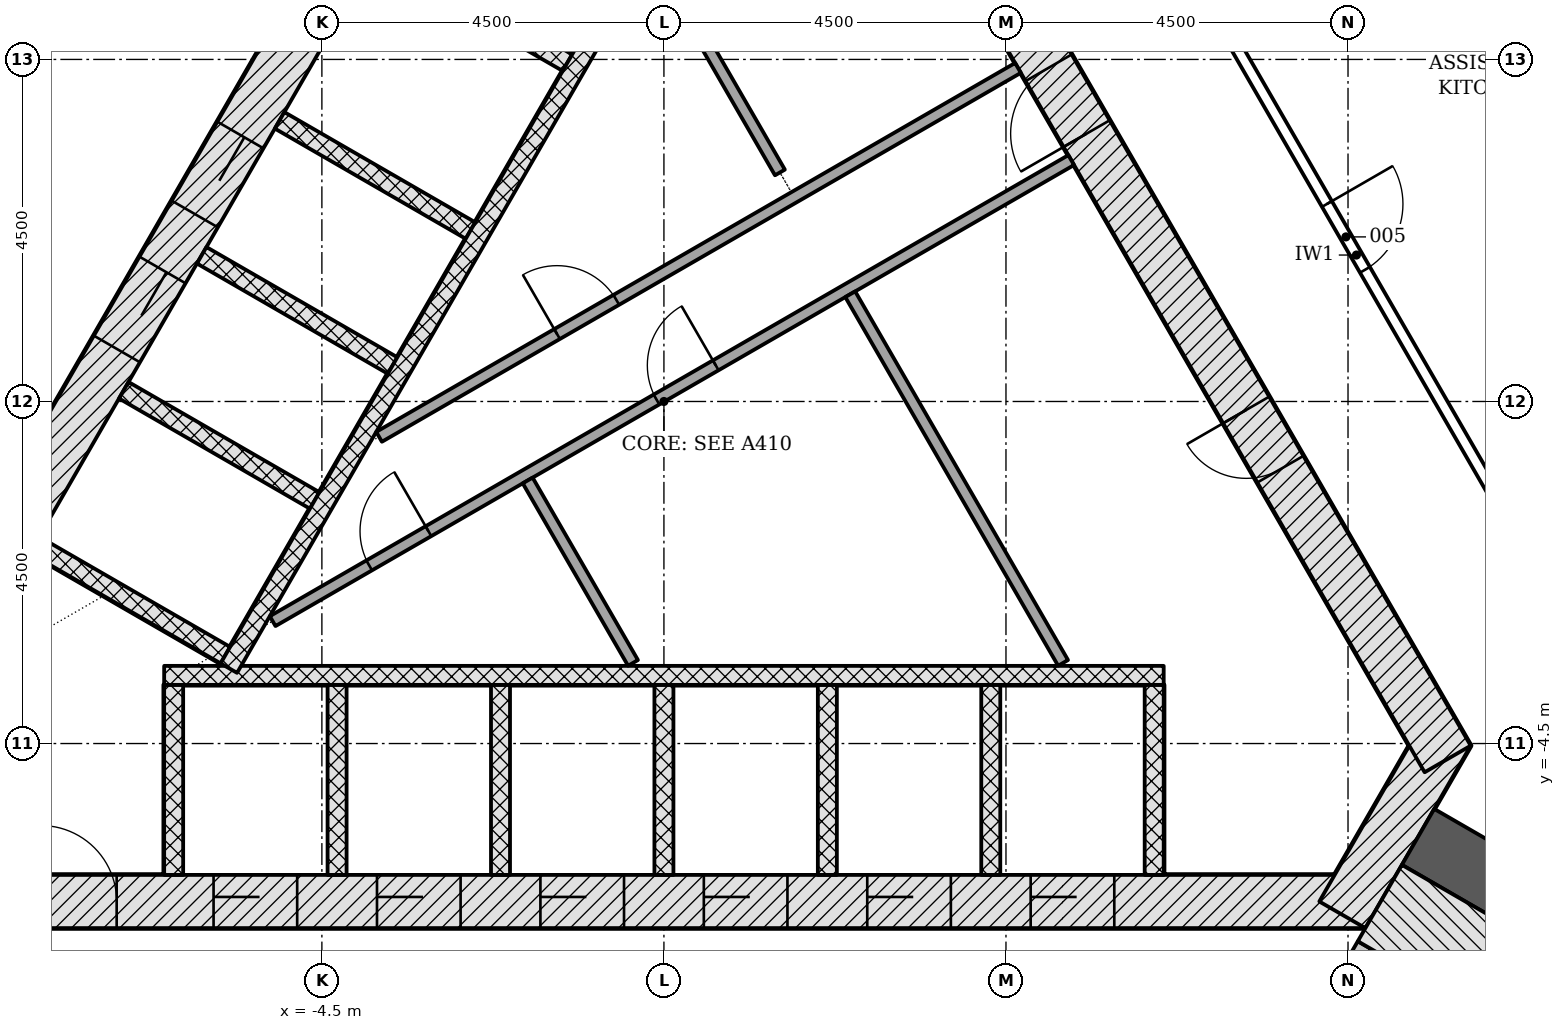
"""IFC4 building model, lengths in metres.
Left out: names, types, materials, properties, quantities, classifications, styles, units other than length and angle.
Written with IfcOpenShell. Run it as: python <this file> out.ifc"""

import sys

from ifc_helpers import new_model, si_unit, direction, frame, frame_2d, origin, place, context, subcontext, project, spatial, rectangle, extrude, element, fill, save


model = new_model("IFC4")
c1 = context("Model", 3, precision=1e-05, world=origin(), true_north=direction((0.0, 1.0)))
c2 = subcontext(c1, "Body", "Model", "MODEL_VIEW")
j1 = project(units=[si_unit("LENGTHUNIT", "METRE"), si_unit("PLANEANGLEUNIT", "RADIAN")], contexts=[c1])
p1 = place(None, origin())
s1 = spatial("IfcSite", under=j1, at=p1, CompositionType="ELEMENT")
p2 = place(p1, origin())
s2 = spatial("IfcBuilding", under=s1, at=p2, CompositionType="ELEMENT")
p3 = place(p2, frame((0.0, 0.0, 69.0)))
s3 = spatial("IfcBuildingStorey", under=s2, at=p3, CompositionType="ELEMENT", Elevation=69.0)
p4 = place(p3, frame((-9.229, -6.578, -0.2), z_axis=(0.0, 0.0, 1.0), x_axis=(1.0, 0.0, 0.0)))
e1 = element("IfcWall", 1, at=p4, inside=s3, PredefinedType="SHEAR", context=c2, shape_type="SweptSolid", body=[
    extrude(rectangle(XDim=18.458, YDim=0.7, at=frame_2d((9.229, 0.0))), origin(), (0.0, 0.0, 1.0), 3.6),
])
p5 = place(p4, frame((3.304, 0.0, 0.2)))
e2 = element("IfcOpeningElement", 2, at=p5, cuts=e1, PredefinedType="OPENING", context=c2, shape_type="SweptSolid", body=[
    extrude(rectangle(XDim=1.1, YDim=2.1, at=frame_2d((0.55, 1.05))), frame((0.0, 0.36, 0.0), z_axis=(0.0, -1.0, 0.0), x_axis=(1.0, 0.0, 0.0)), (0.0, 0.0, 1.0), 0.72),
])
p6 = place(p4, frame((5.454, 0.0, 0.2)))
e3 = element("IfcOpeningElement", 3, at=p6, cuts=e1, PredefinedType="OPENING", context=c2, shape_type="SweptSolid", body=[
    extrude(rectangle(XDim=1.1, YDim=2.1, at=frame_2d((0.55, 1.05))), frame((0.0, 0.36, 0.0), z_axis=(0.0, -1.0, 0.0), x_axis=(1.0, 0.0, 0.0)), (0.0, 0.0, 1.0), 0.72),
])
p7 = place(p4, frame((7.604, 0.0, 0.2)))
e4 = element("IfcOpeningElement", 4, at=p7, cuts=e1, PredefinedType="OPENING", context=c2, shape_type="SweptSolid", body=[
    extrude(rectangle(XDim=1.1, YDim=2.1, at=frame_2d((0.55, 1.05))), frame((0.0, 0.36, 0.0), z_axis=(0.0, -1.0, 0.0), x_axis=(1.0, 0.0, 0.0)), (0.0, 0.0, 1.0), 0.72),
])
p8 = place(p4, frame((9.754, 0.0, 0.2)))
e5 = element("IfcOpeningElement", 5, at=p8, cuts=e1, PredefinedType="OPENING", context=c2, shape_type="SweptSolid", body=[
    extrude(rectangle(XDim=1.1, YDim=2.1, at=frame_2d((0.55, 1.05))), frame((0.0, 0.36, 0.0), z_axis=(0.0, -1.0, 0.0), x_axis=(1.0, 0.0, 0.0)), (0.0, 0.0, 1.0), 0.72),
])
p9 = place(p4, frame((11.904, 0.0, 0.2)))
e6 = element("IfcOpeningElement", 6, at=p9, cuts=e1, PredefinedType="OPENING", context=c2, shape_type="SweptSolid", body=[
    extrude(rectangle(XDim=1.1, YDim=2.1, at=frame_2d((0.55, 1.05))), frame((0.0, 0.36, 0.0), z_axis=(0.0, -1.0, 0.0), x_axis=(1.0, 0.0, 0.0)), (0.0, 0.0, 1.0), 0.72),
])
p10 = place(p4, frame((14.054, 0.0, 0.2)))
e7 = element("IfcOpeningElement", 7, at=p10, cuts=e1, PredefinedType="OPENING", context=c2, shape_type="SweptSolid", body=[
    extrude(rectangle(XDim=1.1, YDim=2.1, at=frame_2d((0.55, 1.05))), frame((0.0, 0.36, 0.0), z_axis=(0.0, -1.0, 0.0), x_axis=(1.0, 0.0, 0.0)), (0.0, 0.0, 1.0), 0.72),
])
p11 = place(p4, frame((1.029, 0.0, 0.2)))
e8 = element("IfcOpeningElement", 8, at=p11, cuts=e1, PredefinedType="OPENING", context=c2, shape_type="SweptSolid", body=[
    extrude(rectangle(XDim=1.0, YDim=2.1, at=frame_2d((0.5, 1.05))), frame((0.0, 0.36, 0.0), z_axis=(0.0, -1.0, 0.0), x_axis=(1.0, 0.0, 0.0)), (0.0, 0.0, 1.0), 0.72),
])
p12 = place(p3, frame((8.926, -6.753, -0.2), z_axis=(0.0, 0.0, 1.0), x_axis=(0.500042739161, 0.866000726912, 0.0)))
e9 = element("IfcWall", 9, at=p12, inside=s3, PredefinedType="SHEAR", context=c2, shape_type="SweptSolid", body=[
    extrude(rectangle(XDim=2.771, YDim=0.7, at=frame_2d((1.386, 0.0))), origin(), (0.0, 0.0, 1.0), 3.6),
])
p13 = place(p3, frame((10.311, -4.703, -0.2), z_axis=(0.0, 0.0, 1.0), x_axis=(-0.500001446645, 0.866024568562, 0.0)))
e10 = element("IfcWall", 10, at=p13, inside=s3, PredefinedType="SHEAR", context=c2, shape_type="SweptSolid", body=[
    extrude(rectangle(XDim=18.458, YDim=0.7, at=frame_2d((9.229, 0.0))), origin(), (0.0, 0.0, 1.0), 3.6),
])
p14 = place(p13, frame((9.5, 0.0, 0.2)))
e11 = element("IfcOpeningElement", 11, at=p14, cuts=e10, PredefinedType="OPENING", context=c2, shape_type="SweptSolid", body=[
    extrude(rectangle(XDim=1.0, YDim=2.1, at=frame_2d((0.5, 1.05))), frame((0.0, 0.36, 0.0), z_axis=(0.0, -1.0, 0.0), x_axis=(1.0, 0.0, 0.0)), (0.0, 0.0, 1.0), 0.72),
])
p15 = place(p13, frame((4.402, 0.0, 0.2)))
e12 = element("IfcOpeningElement", 12, at=p15, cuts=e10, PredefinedType="OPENING", context=c2, shape_type="SweptSolid", body=[
    extrude(rectangle(XDim=0.9, YDim=2.1, at=frame_2d((0.45, 1.05))), frame((0.0, 0.36, 0.0), z_axis=(0.0, -1.0, 0.0), x_axis=(1.0, 0.0, 0.0)), (0.0, 0.0, 1.0), 0.72),
])
p16 = place(p13, frame((13.927, 0.0, 0.2)))
e13 = element("IfcOpeningElement", 13, at=p16, cuts=e10, PredefinedType="OPENING", context=c2, shape_type="SweptSolid", body=[
    extrude(rectangle(XDim=0.9, YDim=2.1, at=frame_2d((0.45, 1.05))), frame((0.0, 0.36, 0.0), z_axis=(0.0, -1.0, 0.0), x_axis=(1.0, 0.0, 0.0)), (0.0, 0.0, 1.0), 0.72),
])
p17 = place(p3, frame((-1.083, 11.281, -0.2), z_axis=(0.0, 0.0, 1.0), x_axis=(-0.500001446645, -0.866024568562, 0.0)))
e14 = element("IfcWall", 14, at=p17, inside=s3, PredefinedType="SHEAR", context=c2, shape_type="SweptSolid", body=[
    extrude(rectangle(XDim=18.458, YDim=0.7, at=frame_2d((9.229, 0.0))), origin(), (0.0, 0.0, 1.0), 3.6),
])
p18 = place(p17, frame((8.979, 0.0, 0.2)))
e15 = element("IfcOpeningElement", 15, at=p18, cuts=e14, PredefinedType="OPENING", context=c2, shape_type="SweptSolid", body=[
    extrude(rectangle(XDim=1.2, YDim=2.1, at=frame_2d((0.6, 1.05))), frame((0.0, 0.36, 0.0), z_axis=(0.0, -1.0, 0.0), x_axis=(1.0, 0.0, 0.0)), (0.0, 0.0, 1.0), 0.72),
])
p19 = place(p17, frame((11.029, 0.0, 0.2)))
e16 = element("IfcOpeningElement", 16, at=p19, cuts=e14, PredefinedType="OPENING", context=c2, shape_type="SweptSolid", body=[
    extrude(rectangle(XDim=1.2, YDim=2.1, at=frame_2d((0.6, 1.05))), frame((0.0, 0.36, 0.0), z_axis=(0.0, -1.0, 0.0), x_axis=(1.0, 0.0, 0.0)), (0.0, 0.0, 1.0), 0.72),
])
p20 = place(p3, frame((9.922, -5.728, -0.2), z_axis=(0.0, 0.0, 1.0), x_axis=(0.866026077102, -0.499998833779, 0.0)))
e17 = element("IfcWall", 17, at=p20, inside=s3, PredefinedType="SHEAR", context=c2, shape_type="SweptSolid", body=[
    extrude(rectangle(XDim=13.381, YDim=0.85, at=frame_2d((6.691, 0.0))), origin(), (0.0, 0.0, 1.0), 3.6),
])
for number, where, z_axis, x_axis in (
    (18, (-6.45, -6.228, -0.2), (0.0, 0.0, 1.0), (0.0, 1.0, 0.0)),
    (19, (-4.3, -6.228, -0.2), (0.0, 0.0, 1.0), (0.0, 1.0, 0.0)),
    (20, (-2.15, -6.228, -0.2), (0.0, 0.0, 1.0), (0.0, 1.0, 0.0)),
    (21, (0.0, -6.228, -0.2), (0.0, 0.0, 1.0), (0.0, 1.0, 0.0)),
    (22, (2.15, -6.228, -0.2), (0.0, 0.0, 1.0), (0.0, 1.0, 0.0)),
    (23, (4.3, -6.228, -0.2), (0.0, 0.0, 1.0), (0.0, 1.0, 0.0)),
    (24, (6.45, -6.228, -0.2), (0.0, 0.0, 1.0), (0.0, 1.0, 0.0)),
):
    element("IfcWall", number, at=place(p3, frame(where, z_axis=z_axis, x_axis=x_axis)), inside=s3, PredefinedType="PARTITIONING", context=c2, shape_type="SweptSolid", body=[
        extrude(rectangle(XDim=2.5, YDim=0.25, at=frame_2d((1.25, 0.0))), origin(), (0.0, 0.0, 1.0), 3.6),
    ])
p21 = place(p3, frame((-6.575, -3.603, 0.0), z_axis=(0.0, 0.0, 1.0), x_axis=(1.0, 0.0, 0.0)))
e25 = element("IfcWall", 25, at=p21, inside=s3, PredefinedType="PARTITIONING", context=c2, shape_type="SweptSolid", body=[
    extrude(rectangle(XDim=13.15, YDim=0.25, at=frame_2d((6.575, 0.0))), origin(), (0.0, 0.0, 1.0), 3.4),
])
for number, where, z_axis, x_axis in (
    (26, (-3.781, 5.907, -0.2), (0.0, 0.0, 1.0), (0.866, -0.5, 0.0)),
    (27, (-5.056, 3.699, -0.2), (0.0, 0.0, 1.0), (0.866, -0.5, 0.0)),
    (28, (-6.081, 1.923, -0.2), (0.0, 0.0, 1.0), (0.866, -0.5, 0.0)),
    (29, (-7.106, 0.148, -0.2), (0.0, 0.0, 1.0), (0.866, -0.5, 0.0)),
    (30, (-8.281, -1.887, -0.2), (0.0, 0.0, 1.0), (0.866, -0.5, 0.0)),
):
    element("IfcWall", number, at=place(p3, frame(where, z_axis=z_axis, x_axis=x_axis)), inside=s3, PredefinedType="PARTITIONING", context=c2, shape_type="SweptSolid", body=[
        extrude(rectangle(XDim=2.9, YDim=0.25, at=frame_2d((1.45, 0.0))), origin(), (0.0, 0.0, 1.0), 3.6),
    ])
p22 = place(p3, frame((0.176, 6.711, 0.0), z_axis=(0.0, 0.0, 1.0), x_axis=(-0.500004227369, -0.866022963098, 0.0)))
e31 = element("IfcWall", 31, at=p22, inside=s3, PredefinedType="PARTITIONING", context=c2, shape_type="SweptSolid", body=[
    extrude(rectangle(XDim=11.8, YDim=0.25, at=frame_2d((5.9, 0.0))), origin(), (0.0, 0.0, 1.0), 3.4),
])
p23 = place(p3, frame((-5.148, -2.89, 0.0), z_axis=(0.0, 0.0, 1.0), x_axis=(0.866030081544, 0.499991897794, 0.0)))
e32 = element("IfcWall", 32, at=p23, inside=s3, PredefinedType="PARTITIONING", context=c2, shape_type="SweptSolid", body=[
    extrude(rectangle(XDim=12.131, YDim=0.15, at=frame_2d((6.065, 0.0))), origin(), (0.0, 0.0, 1.0), 3.4),
])
p24 = place(p23, frame((5.831, 0.0, 0.0)))
e33 = element("IfcOpeningElement", 33, at=p24, cuts=e32, PredefinedType="OPENING", context=c2, shape_type="SweptSolid", body=[
    extrude(rectangle(XDim=0.9, YDim=2.1, at=frame_2d((0.45, 1.05))), frame((0.0, 0.085, 0.0), z_axis=(0.0, -1.0, 0.0), x_axis=(1.0, 0.0, 0.0)), (0.0, 0.0, 1.0), 0.17),
])
p25 = place(p23, frame((1.467, 0.0, 0.0)))
e34 = element("IfcOpeningElement", 34, at=p25, cuts=e32, PredefinedType="OPENING", context=c2, shape_type="SweptSolid", body=[
    extrude(rectangle(XDim=0.9, YDim=2.1, at=frame_2d((0.45, 1.05))), frame((0.0, 0.085, 0.0), z_axis=(0.0, -1.0, 0.0), x_axis=(1.0, 0.0, 0.0)), (0.0, 0.0, 1.0), 0.17),
])
p26 = place(p3, frame((-3.748, -0.465, 0.0), z_axis=(0.0, 0.0, 1.0), x_axis=(0.866033540873, 0.499985905884, 0.0)))
e35 = element("IfcWall", 35, at=p26, inside=s3, PredefinedType="PARTITIONING", context=c2, shape_type="SweptSolid", body=[
    extrude(rectangle(XDim=9.706, YDim=0.15, at=frame_2d((4.853, 0.0))), origin(), (0.0, 0.0, 1.0), 3.4),
])
p27 = place(p26, frame((2.704, 0.0, 0.0)))
e36 = element("IfcOpeningElement", 36, at=p27, cuts=e35, PredefinedType="OPENING", context=c2, shape_type="SweptSolid", body=[
    extrude(rectangle(XDim=0.9, YDim=2.1, at=frame_2d((0.45, 1.05))), frame((0.0, 0.085, 0.0), z_axis=(0.0, -1.0, 0.0), x_axis=(1.0, 0.0, 0.0)), (0.0, 0.0, 1.0), 0.17),
])
p28 = place(p3, frame((1.526, 3.013, 0.0), z_axis=(0.0, 0.0, 1.0), x_axis=(-0.499978925887, 0.866037570588, 0.0)))
e37 = element("IfcWall", 37, at=p28, inside=s3, PredefinedType="PARTITIONING", context=c2, shape_type="SweptSolid", body=[
    extrude(rectangle(XDim=3.296, YDim=0.15, at=frame_2d((1.648, 0.0))), origin(), (0.0, 0.0, 1.0), 3.4),
])
p29 = place(p3, frame((-0.407, -3.439, 0.0), z_axis=(0.0, 0.0, 1.0), x_axis=(-0.500004591975, 0.86602275259, 0.0)))
e38 = element("IfcWall", 38, at=p29, inside=s3, PredefinedType="PARTITIONING", context=c2, shape_type="SweptSolid", body=[
    extrude(rectangle(XDim=2.771, YDim=0.15, at=frame_2d((1.386, 0.0))), origin(), (0.0, 0.0, 1.0), 3.4),
])
p30 = place(p3, frame((5.251, -3.439, 0.0), z_axis=(0.0, 0.0, 1.0), x_axis=(-0.500011755427, 0.866018616679, 0.0)))
e39 = element("IfcWall", 39, at=p30, inside=s3, PredefinedType="PARTITIONING", context=c2, shape_type="SweptSolid", body=[
    extrude(rectangle(XDim=5.6, YDim=0.15, at=frame_2d((2.8, 0.0))), origin(), (0.0, 0.0, 1.0), 3.4),
])
p31 = place(p3, frame((7.44, -10.226, -0.2), z_axis=(0.0, 0.0, 1.0), x_axis=(0.500022077904, 0.866012656725, 0.0)))
e40 = element("IfcWall", 40, at=p31, inside=s3, PredefinedType="SHEAR", context=c2, shape_type="SweptSolid", body=[
    extrude(rectangle(XDim=3.55, YDim=0.2, at=frame_2d((1.775, 0.0))), origin(), (0.0, 0.0, 1.0), 3.6),
])
p32 = place(p31, frame((1.175, 0.0, 0.2)))
e41 = element("IfcOpeningElement", 41, at=p32, cuts=e40, PredefinedType="OPENING", context=c2, shape_type="SweptSolid", body=[
    extrude(rectangle(XDim=1.2, YDim=2.1, at=frame_2d((0.6, 1.05))), frame((0.0, 0.11, 0.0), z_axis=(0.0, -1.0, 0.0), x_axis=(1.0, 0.0, 0.0)), (0.0, 0.0, 1.0), 0.22),
])
p33 = place(p3, frame((9.419, -6.599, -0.2), z_axis=(0.0, 0.0, 1.0), x_axis=(0.866033125095, -0.499986626058, 0.0)))
e42 = element("IfcWall", 42, at=p33, inside=s3, PredefinedType="SHEAR", context=c2, shape_type="SweptSolid", body=[
    extrude(rectangle(XDim=7.2, YDim=1.161, at=frame_2d((3.6, 0.0))), origin(), (0.0, 0.0, 1.0), 3.6),
])
p34 = place(p3, frame((-16.256, -3.149, 0.0), z_axis=(0.0, 0.0, 1.0), x_axis=(0.499999683919, 0.866025586274, 0.0)))
e43 = element("IfcWall", 43, at=p34, inside=s3, PredefinedType="PARTITIONING", context=c2, shape_type="SweptSolid", body=[
    extrude(rectangle(XDim=22.234, YDim=0.15, at=frame_2d((11.117, 0.0))), origin(), (0.0, 0.0, 1.0), 2.778),
])
p35 = place(p34, frame((13.551, 0.0, 0.0)))
e44 = element("IfcOpeningElement", 44, at=p35, cuts=e43, PredefinedType="OPENING", context=c2, shape_type="SweptSolid", body=[
    extrude(rectangle(XDim=1.0, YDim=2.1, at=frame_2d((0.5, 1.05))), frame((0.0, 0.085, 0.0), z_axis=(0.0, -1.0, 0.0), x_axis=(1.0, 0.0, 0.0)), (0.0, 0.0, 1.0), 0.17),
])
p36 = place(p34, frame((5.647, 0.0, 0.0)))
e45 = element("IfcOpeningElement", 45, at=p36, cuts=e43, PredefinedType="OPENING", context=c2, shape_type="SweptSolid", body=[
    extrude(rectangle(XDim=1.5, YDim=2.1, at=frame_2d((0.75, 1.05))), frame((0.0, 0.085, 0.0), z_axis=(0.0, -1.0, 0.0), x_axis=(1.0, 0.0, 0.0)), (0.0, 0.0, 1.0), 0.17),
])
p37 = place(p3, frame((-4.407, 13.374, 0.0), z_axis=(0.0, 0.0, 1.0), x_axis=(-0.499997181693, -0.866027030928, 0.0)))
e46 = element("IfcWall", 46, at=p37, inside=s3, PredefinedType="PARTITIONING", context=c2, shape_type="SweptSolid", body=[
    extrude(rectangle(XDim=16.77, YDim=0.15, at=frame_2d((8.385, 0.0))), origin(), (0.0, 0.0, 1.0), 2.778),
])
p38 = place(p37, frame((8.879, 0.0, 0.0)))
e47 = element("IfcOpeningElement", 47, at=p38, cuts=e46, PredefinedType="OPENING", context=c2, shape_type="SweptSolid", body=[
    extrude(rectangle(XDim=1.0, YDim=2.1, at=frame_2d((0.5, 1.05))), frame((0.0, 0.085, 0.0), z_axis=(0.0, -1.0, 0.0), x_axis=(1.0, 0.0, 0.0)), (0.0, 0.0, 1.0), 0.17),
])
p39 = place(p3, frame((5.346, 8.446, 0.0), z_axis=(0.0, 0.0, 1.0), x_axis=(0.500008781656, -0.866020333634, 0.0)))
e48 = element("IfcWall", 48, at=p39, inside=s3, PredefinedType="PARTITIONING", context=c2, shape_type="SweptSolid", body=[
    extrude(rectangle(XDim=15.057, YDim=0.15, at=frame_2d((7.528, 0.0))), origin(), (0.0, 0.0, 1.0), 2.778),
])
p40 = place(p39, frame((12.55, 0.0, 0.0)))
e49 = element("IfcOpeningElement", 49, at=p40, cuts=e48, PredefinedType="OPENING", context=c2, shape_type="SweptSolid", body=[
    extrude(rectangle(XDim=1.0, YDim=2.1, at=frame_2d((0.5, 1.05))), frame((0.0, 0.085, 0.0), z_axis=(0.0, -1.0, 0.0), x_axis=(1.0, 0.0, 0.0)), (0.0, 0.0, 1.0), 0.17),
])
p41 = place(p39, frame((6.753, 0.0, 0.0)))
e50 = element("IfcOpeningElement", 50, at=p41, cuts=e48, PredefinedType="OPENING", context=c2, shape_type="SweptSolid", body=[
    extrude(rectangle(XDim=1.0, YDim=2.1, at=frame_2d((0.5, 1.05))), frame((0.0, 0.085, 0.0), z_axis=(0.0, -1.0, 0.0), x_axis=(1.0, 0.0, 0.0)), (0.0, 0.0, 1.0), 0.17),
])
p42 = place(p5, origin())
e51 = element("IfcDoor", 51, at=p42, inside=s3, OperationType="DOUBLE_DOOR_SLIDING", PredefinedType="DOOR", context=c2, shape_type="SweptSolid", body=[
    extrude(rectangle(XDim=1.1, YDim=2.1, at=frame_2d((0.55, 1.05))), frame((0.0, 0.025, 0.0), z_axis=(0.0, -1.0, 0.0), x_axis=(1.0, 0.0, 0.0)), (0.0, 0.0, 1.0), 0.05),
])
fill(e2, e51)
p43 = place(p6, origin())
e52 = element("IfcDoor", 52, at=p43, inside=s3, OperationType="DOUBLE_DOOR_SLIDING", PredefinedType="DOOR", context=c2, shape_type="SweptSolid", body=[
    extrude(rectangle(XDim=1.1, YDim=2.1, at=frame_2d((0.55, 1.05))), frame((0.0, 0.025, 0.0), z_axis=(0.0, -1.0, 0.0), x_axis=(1.0, 0.0, 0.0)), (0.0, 0.0, 1.0), 0.05),
])
fill(e3, e52)
p44 = place(p7, origin())
e53 = element("IfcDoor", 53, at=p44, inside=s3, OperationType="DOUBLE_DOOR_SLIDING", PredefinedType="DOOR", context=c2, shape_type="SweptSolid", body=[
    extrude(rectangle(XDim=1.1, YDim=2.1, at=frame_2d((0.55, 1.05))), frame((0.0, 0.025, 0.0), z_axis=(0.0, -1.0, 0.0), x_axis=(1.0, 0.0, 0.0)), (0.0, 0.0, 1.0), 0.05),
])
fill(e4, e53)
p45 = place(p8, origin())
e54 = element("IfcDoor", 54, at=p45, inside=s3, OperationType="DOUBLE_DOOR_SLIDING", PredefinedType="DOOR", context=c2, shape_type="SweptSolid", body=[
    extrude(rectangle(XDim=1.1, YDim=2.1, at=frame_2d((0.55, 1.05))), frame((0.0, 0.025, 0.0), z_axis=(0.0, -1.0, 0.0), x_axis=(1.0, 0.0, 0.0)), (0.0, 0.0, 1.0), 0.05),
])
fill(e5, e54)
p46 = place(p9, origin())
e55 = element("IfcDoor", 55, at=p46, inside=s3, OperationType="DOUBLE_DOOR_SLIDING", PredefinedType="DOOR", context=c2, shape_type="SweptSolid", body=[
    extrude(rectangle(XDim=1.1, YDim=2.1, at=frame_2d((0.55, 1.05))), frame((0.0, 0.025, 0.0), z_axis=(0.0, -1.0, 0.0), x_axis=(1.0, 0.0, 0.0)), (0.0, 0.0, 1.0), 0.05),
])
fill(e6, e55)
p47 = place(p10, origin())
e56 = element("IfcDoor", 56, at=p47, inside=s3, OperationType="DOUBLE_DOOR_SLIDING", PredefinedType="DOOR", context=c2, shape_type="SweptSolid", body=[
    extrude(rectangle(XDim=1.1, YDim=2.1, at=frame_2d((0.55, 1.05))), frame((0.0, 0.025, 0.0), z_axis=(0.0, -1.0, 0.0), x_axis=(1.0, 0.0, 0.0)), (0.0, 0.0, 1.0), 0.05),
])
fill(e7, e56)
p48 = place(p18, origin())
e57 = element("IfcDoor", 57, at=p48, inside=s3, OperationType="DOUBLE_DOOR_SLIDING", PredefinedType="DOOR", context=c2, shape_type="SweptSolid", body=[
    extrude(rectangle(XDim=1.2, YDim=2.1, at=frame_2d((0.6, 1.05))), frame((0.0, 0.025, 0.0), z_axis=(0.0, -1.0, 0.0), x_axis=(1.0, 0.0, 0.0)), (0.0, 0.0, 1.0), 0.05),
])
fill(e15, e57)
p49 = place(p19, origin())
e58 = element("IfcDoor", 58, at=p49, inside=s3, OperationType="DOUBLE_DOOR_SLIDING", PredefinedType="DOOR", context=c2, shape_type="SweptSolid", body=[
    extrude(rectangle(XDim=1.2, YDim=2.1, at=frame_2d((0.6, 1.05))), frame((0.0, 0.025, 0.0), z_axis=(0.0, -1.0, 0.0), x_axis=(1.0, 0.0, 0.0)), (0.0, 0.0, 1.0), 0.05),
])
fill(e16, e58)
p50 = place(p14, origin())
e59 = element("IfcDoor", 59, at=p50, inside=s3, OperationType="SINGLE_SWING_LEFT", PredefinedType="DOOR", context=c2, shape_type="SweptSolid", body=[
    extrude(rectangle(XDim=1.0, YDim=2.1, at=frame_2d((0.5, 1.05))), frame((0.0, 0.075, 0.0), z_axis=(0.0, -1.0, 0.0), x_axis=(1.0, 0.0, 0.0)), (0.0, 0.0, 1.0), 0.15),
])
fill(e11, e59)
p51 = place(p15, origin())
e60 = element("IfcDoor", 60, at=p51, inside=s3, OperationType="SINGLE_SWING_RIGHT", PredefinedType="DOOR", context=c2, shape_type="SweptSolid", body=[
    extrude(rectangle(XDim=0.9, YDim=2.1, at=frame_2d((0.45, 1.05))), frame((0.0, 0.075, 0.0), z_axis=(0.0, -1.0, 0.0), x_axis=(1.0, 0.0, 0.0)), (0.0, 0.0, 1.0), 0.15),
])
fill(e12, e60)
p52 = place(p24, origin())
e61 = element("IfcDoor", 61, at=p52, inside=s3, OperationType="SINGLE_SWING_RIGHT", PredefinedType="DOOR", context=c2, shape_type="SweptSolid", body=[
    extrude(rectangle(XDim=0.9, YDim=2.1, at=frame_2d((0.45, 1.05))), frame((0.0, 0.025, 0.0), z_axis=(0.0, -1.0, 0.0), x_axis=(1.0, 0.0, 0.0)), (0.0, 0.0, 1.0), 0.05),
])
fill(e33, e61)
p53 = place(p27, origin())
e62 = element("IfcDoor", 62, at=p53, inside=s3, OperationType="SINGLE_SWING_LEFT", PredefinedType="DOOR", context=c2, shape_type="SweptSolid", body=[
    extrude(rectangle(XDim=0.9, YDim=2.1, at=frame_2d((0.45, 1.05))), frame((0.0, 0.025, 0.0), z_axis=(0.0, -1.0, 0.0), x_axis=(1.0, 0.0, 0.0)), (0.0, 0.0, 1.0), 0.05),
])
fill(e36, e62)
p54 = place(p25, origin())
e63 = element("IfcDoor", 63, at=p54, inside=s3, OperationType="SINGLE_SWING_RIGHT", PredefinedType="DOOR", context=c2, shape_type="SweptSolid", body=[
    extrude(rectangle(XDim=0.9, YDim=2.1, at=frame_2d((0.45, 1.05))), frame((0.0, 0.025, 0.0), z_axis=(0.0, -1.0, 0.0), x_axis=(1.0, 0.0, 0.0)), (0.0, 0.0, 1.0), 0.05),
])
fill(e34, e63)
p55 = place(p11, origin())
e64 = element("IfcDoor", 64, at=p55, inside=s3, OperationType="SINGLE_SWING_LEFT", PredefinedType="DOOR", context=c2, shape_type="SweptSolid", body=[
    extrude(rectangle(XDim=1.0, YDim=2.1, at=frame_2d((0.5, 1.05))), frame((0.0, 0.075, 0.0), z_axis=(0.0, -1.0, 0.0), x_axis=(1.0, 0.0, 0.0)), (0.0, 0.0, 1.0), 0.15),
])
fill(e8, e64)
p56 = place(p41, origin())
e65 = element("IfcDoor", 65, at=p56, inside=s3, OperationType="SINGLE_SWING_LEFT", PredefinedType="DOOR", context=c2, shape_type="SweptSolid", body=[
    extrude(rectangle(XDim=1.0, YDim=2.1, at=frame_2d((0.5, 1.05))), frame((0.0, 0.025, 0.0), z_axis=(0.0, -1.0, 0.0), x_axis=(1.0, 0.0, 0.0)), (0.0, 0.0, 1.0), 0.05),
])
fill(e50, e65)
save(model, sys.argv[1])
